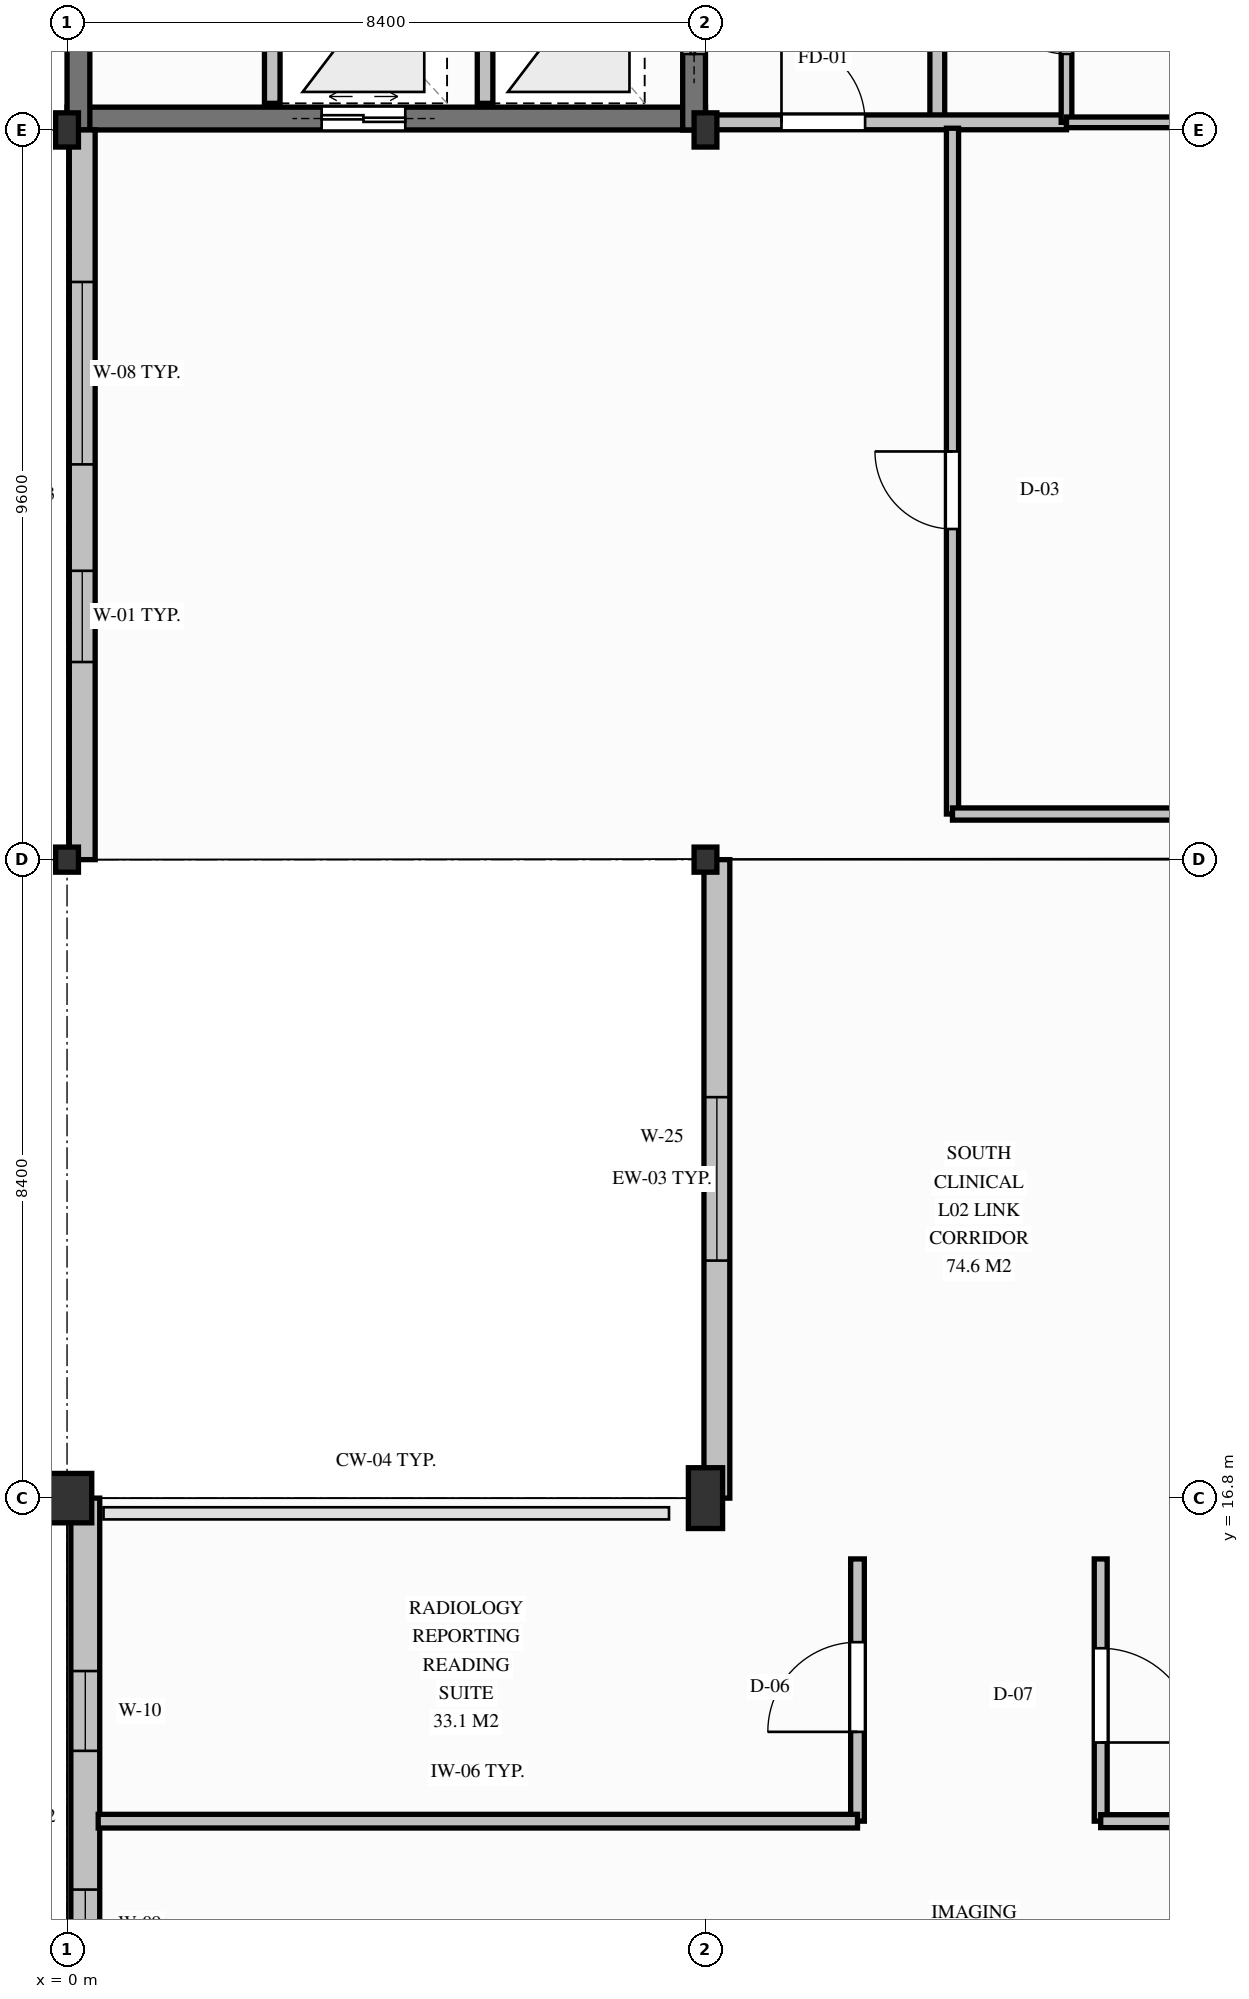
"""IFC4 building model, lengths in metres.
Left out: names, types, materials, properties, quantities, classifications, styles, units other than length and angle.
Written with IfcOpenShell. Run it as: python <this file> out.ifc"""

import sys

from ifc_helpers import new_model, si_unit, direction, frame, frame_2d, origin, origin_2d, place, context, subcontext, project, spatial, rectangle, circle, i_section, extrude, element, fill, save


model = new_model("IFC4")
c1 = context("Model", 3, precision=1e-05, world=origin(), true_north=direction((0.0, 1.0)))
c2 = subcontext(c1, "Body", "Model", "MODEL_VIEW")
j1 = project(units=[si_unit("LENGTHUNIT", "METRE"), si_unit("PLANEANGLEUNIT", "RADIAN")], contexts=[c1])
p1 = place(None, origin())
s1 = spatial("IfcSite", under=j1, at=p1, CompositionType="ELEMENT")
p2 = place(p1, origin())
s2 = spatial("IfcBuilding", under=s1, at=p2, CompositionType="ELEMENT")
p3 = place(p2, frame((0.0, 0.0, 9.0)))
s3 = spatial("IfcBuildingStorey", under=s2, at=p3, CompositionType="ELEMENT", Elevation=9.0)
p4 = place(p3, frame((0.0, 34.95, 0.0), z_axis=(0.0, 0.0, 1.0), x_axis=(1.0, 0.0, 0.0)))
e1 = element("IfcWall", 1, at=p4, inside=s3, PredefinedType="SHEAR", context=c2, shape_type="SweptSolid", body=[
    extrude(rectangle(XDim=8.4, YDim=0.3, at=frame_2d((4.2, 0.0))), origin(), (0.0, 0.0, 1.0), 4.2),
])
p5 = place(p4, frame((3.35, 0.0, 0.0)))
e2 = element("IfcOpeningElement", 2, at=p5, cuts=e1, PredefinedType="OPENING", context=c2, shape_type="SweptSolid", body=[
    extrude(rectangle(XDim=1.1, YDim=2.1, at=frame_2d((0.55, 1.05))), frame((0.0, 0.16, 0.0), z_axis=(0.0, -1.0, 0.0), x_axis=(1.0, 0.0, 0.0)), (0.0, 0.0, 1.0), 0.32),
])
p6 = place(p3, frame((0.15, 34.8, 0.0), z_axis=(0.0, 0.0, 1.0), x_axis=(0.0, 1.0, 0.0)))
e3 = element("IfcWall", 3, at=p6, inside=s3, PredefinedType="SHEAR", context=c2, shape_type="SweptSolid", body=[
    extrude(rectangle(XDim=8.0, YDim=0.3, at=frame_2d((4.0, 0.0))), origin(), (0.0, 0.0, 1.0), 4.2),
])
p7 = place(p3, frame((8.25, 34.8, 0.0), z_axis=(0.0, 0.0, 1.0), x_axis=(0.0, 1.0, 0.0)))
e4 = element("IfcWall", 4, at=p7, inside=s3, PredefinedType="SHEAR", context=c2, shape_type="SweptSolid", body=[
    extrude(rectangle(XDim=8.0, YDim=0.3, at=frame_2d((4.0, 0.0))), origin(), (0.0, 0.0, 1.0), 4.2),
])
p8 = place(p7, frame((2.95, 0.0, 0.0)))
e5 = element("IfcOpeningElement", 5, at=p8, cuts=e4, PredefinedType="OPENING", context=c2, shape_type="SweptSolid", body=[
    extrude(rectangle(XDim=1.1, YDim=2.15, at=frame_2d((0.55, 1.075))), frame((0.0, 0.16, 0.0), z_axis=(0.0, -1.0, 0.0), x_axis=(1.0, 0.0, 0.0)), (0.0, 0.0, 1.0), 0.32),
])
p9 = place(p7, frame((1.0, 0.0, 0.0)))
e6 = element("IfcOpeningElement", 6, at=p9, cuts=e4, PredefinedType="OPENING", context=c2, shape_type="SweptSolid", body=[
    extrude(rectangle(XDim=1.1, YDim=2.1, at=frame_2d((0.55, 1.05))), frame((0.0, 0.16, 0.0), z_axis=(0.0, -1.0, 0.0), x_axis=(1.0, 0.0, 0.0)), (0.0, 0.0, 1.0), 0.32),
])
p10 = place(p3, frame((0.0, 16.8, 0.0), z_axis=(0.0, 0.0, 1.0), x_axis=(1.0, 0.0, 0.0)))
e7 = element("IfcColumn", 7, at=p10, inside=s3, PredefinedType="COLUMN", context=c2, shape_type="SweptSolid", body=[
    extrude(circle(Radius=0.325, at=origin_2d()), origin(), (0.0, 0.0, 1.0), 4.2),
])
p11 = place(p3, frame((0.0, 25.2, 0.0), z_axis=(0.0, 0.0, 1.0), x_axis=(1.0, 0.0, 0.0)))
e8 = element("IfcColumn", 8, at=p11, inside=s3, PredefinedType="COLUMN", context=c2, shape_type="SweptSolid", body=[
    extrude(i_section(OverallWidth=0.3, OverallDepth=0.33, WebThickness=0.01, FlangeThickness=0.017, FilletRadius=0.027, at=origin_2d()), origin(), (0.0, 0.0, 1.0), 4.2),
])
p12 = place(p3, frame((0.0, 34.8, 0.0), z_axis=(0.0, 0.0, 1.0), x_axis=(1.0, 0.0, 0.0)))
e9 = element("IfcColumn", 9, at=p12, inside=s3, PredefinedType="COLUMN", context=c2, shape_type="SweptSolid", body=[
    extrude(i_section(OverallWidth=0.3, OverallDepth=0.45, WebThickness=0.014, FlangeThickness=0.026, FilletRadius=0.027, at=origin_2d()), origin(), (0.0, 0.0, 1.0), 4.2),
])
p13 = place(p3, frame((8.4, 16.8, 0.0), z_axis=(0.0, 0.0, 1.0), x_axis=(1.0, 0.0, 0.0)))
e10 = element("IfcColumn", 10, at=p13, inside=s3, PredefinedType="COLUMN", context=c2, shape_type="SweptSolid", body=[
    extrude(rectangle(XDim=0.45, YDim=0.8, at=origin_2d()), origin(), (0.0, 0.0, 1.0), 4.2),
])
p14 = place(p3, frame((8.4, 25.2, 0.0), z_axis=(0.0, 0.0, 1.0), x_axis=(1.0, 0.0, 0.0)))
e11 = element("IfcColumn", 11, at=p14, inside=s3, PredefinedType="COLUMN", context=c2, shape_type="SweptSolid", body=[
    extrude(i_section(OverallWidth=0.3, OverallDepth=0.33, WebThickness=0.01, FlangeThickness=0.017, FilletRadius=0.027, at=origin_2d()), origin(), (0.0, 0.0, 1.0), 4.2),
])
p15 = place(p3, frame((8.4, 34.8, 0.0), z_axis=(0.0, 0.0, 1.0), x_axis=(1.0, 0.0, 0.0)))
e12 = element("IfcColumn", 12, at=p15, inside=s3, PredefinedType="COLUMN", context=c2, shape_type="SweptSolid", body=[
    extrude(i_section(OverallWidth=0.3, OverallDepth=0.45, WebThickness=0.014, FlangeThickness=0.026, FilletRadius=0.027, at=origin_2d()), origin(), (0.0, 0.0, 1.0), 4.2),
])
p16 = place(p3, frame((0.24, 8.4, 0.0), z_axis=(0.0, 0.0, 1.0), x_axis=(0.0, 1.0, 0.0)))
e13 = element("IfcWall", 13, at=p16, inside=s3, PredefinedType="SOLIDWALL", context=c2, shape_type="SweptSolid", body=[
    extrude(rectangle(XDim=8.4, YDim=0.38, at=frame_2d((4.2, 0.0))), origin(), (0.0, 0.0, 1.0), 3.478),
])
p17 = place(p16, frame((2.35, 0.0, 0.85)))
e14 = element("IfcOpeningElement", 14, at=p17, cuts=e13, PredefinedType="OPENING", context=c2, shape_type="SweptSolid", body=[
    extrude(rectangle(XDim=0.9, YDim=1.8, at=frame_2d((0.45, 0.9))), frame((0.0, 0.2, 0.0), z_axis=(0.0, -1.0, 0.0), x_axis=(1.0, 0.0, 0.0)), (0.0, 0.0, 1.0), 0.4),
])
p18 = place(p16, frame((5.075, 0.0, 0.85)))
e15 = element("IfcOpeningElement", 15, at=p18, cuts=e13, PredefinedType="OPENING", context=c2, shape_type="SweptSolid", body=[
    extrude(rectangle(XDim=1.05, YDim=1.75, at=frame_2d((0.525, 0.875))), frame((0.0, 0.2, 0.0), z_axis=(0.0, -1.0, 0.0), x_axis=(1.0, 0.0, 0.0)), (0.0, 0.0, 1.0), 0.4),
])
p19 = place(p3, frame((8.55, 16.8, 0.0), z_axis=(0.0, 0.0, 1.0), x_axis=(0.0, 1.0, 0.0)))
e16 = element("IfcWall", 16, at=p19, inside=s3, PredefinedType="SOLIDWALL", context=c2, shape_type="SweptSolid", body=[
    extrude(rectangle(XDim=8.4, YDim=0.34, at=frame_2d((4.2, 0.0))), origin(), (0.0, 0.0, 1.0), 3.418),
])
p20 = place(p19, frame((3.125, 0.0, 0.85)))
e17 = element("IfcOpeningElement", 17, at=p20, cuts=e16, PredefinedType="OPENING", context=c2, shape_type="SweptSolid", body=[
    extrude(rectangle(XDim=2.15, YDim=1.75, at=frame_2d((1.075, 0.875))), frame((0.0, 0.18, 0.0), z_axis=(0.0, -1.0, 0.0), x_axis=(1.0, 0.0, 0.0)), (0.0, 0.0, 1.0), 0.36),
])
p21 = place(p3, frame((0.2, 25.2, 0.0), z_axis=(0.0, 0.0, 1.0), x_axis=(0.0, 1.0, 0.0)))
e18 = element("IfcWall", 18, at=p21, inside=s3, PredefinedType="SOLIDWALL", context=c2, shape_type="SweptSolid", body=[
    extrude(rectangle(XDim=9.6, YDim=0.34, at=frame_2d((4.8, 0.0))), origin(), (0.0, 0.0, 1.0), 3.418),
])
p22 = place(p21, frame((2.6, 0.0, 0.85)))
e19 = element("IfcOpeningElement", 19, at=p22, cuts=e18, PredefinedType="OPENING", context=c2, shape_type="SweptSolid", body=[
    extrude(rectangle(XDim=1.2, YDim=1.8, at=frame_2d((0.6, 0.9))), frame((0.0, 0.18, 0.0), z_axis=(0.0, -1.0, 0.0), x_axis=(1.0, 0.0, 0.0)), (0.0, 0.0, 1.0), 0.36),
])
p23 = place(p21, frame((5.2, 0.0, 0.85)))
e20 = element("IfcOpeningElement", 20, at=p23, cuts=e18, PredefinedType="OPENING", context=c2, shape_type="SweptSolid", body=[
    extrude(rectangle(XDim=2.4, YDim=2.05, at=frame_2d((1.2, 1.025))), frame((0.0, 0.18, 0.0), z_axis=(0.0, -1.0, 0.0), x_axis=(1.0, 0.0, 0.0)), (0.0, 0.0, 1.0), 0.36),
])
for number, where, z_axis, x_axis in (
    (21, (5.5, 35.15, 0.0), (0.0, 0.0, 1.0), (0.0, 1.0, 0.0)),
    (22, (2.7, 35.15, 0.0), (0.0, 0.0, 1.0), (0.0, 1.0, 0.0)),
):
    element("IfcWall", number, at=place(p3, frame(where, z_axis=z_axis, x_axis=x_axis)), inside=s3, PredefinedType="PARTITIONING", context=c2, shape_type="SweptSolid", body=[
        extrude(rectangle(XDim=2.4, YDim=0.205, at=frame_2d((1.2, 0.0))), origin(), (0.0, 0.0, 1.0), 3.93),
    ])
p24 = place(p3, frame((11.45, 34.9, 0.0), z_axis=(0.0, 0.0, 1.0), x_axis=(0.0, 1.0, 0.0)))
e23 = element("IfcWall", 23, at=p24, inside=s3, PredefinedType="PARTITIONING", context=c2, shape_type="SweptSolid", body=[
    extrude(rectangle(XDim=2.65, YDim=0.195, at=frame_2d((1.325, 0.0))), origin(), (0.0, 0.0, 1.0), 3.538),
])
p25 = place(p3, frame((8.35, 34.9, 0.0), z_axis=(0.0, 0.0, 1.0), x_axis=(1.0, 0.0, 0.0)))
e24 = element("IfcWall", 24, at=p25, inside=s3, PredefinedType="PARTITIONING", context=c2, shape_type="SweptSolid", body=[
    extrude(rectangle(XDim=4.8, YDim=0.195, at=frame_2d((2.4, 0.0))), origin(), (0.0, 0.0, 1.0), 3.488),
])
p26 = place(p25, frame((1.05, 0.0, 0.0)))
e25 = element("IfcOpeningElement", 25, at=p26, cuts=e24, PredefinedType="OPENING", context=c2, shape_type="SweptSolid", body=[
    extrude(rectangle(XDim=1.1, YDim=2.15, at=frame_2d((0.55, 1.075))), frame((0.0, 0.107, 0.0), z_axis=(0.0, -1.0, 0.0), x_axis=(1.0, 0.0, 0.0)), (0.0, 0.0, 1.0), 0.215),
])
p27 = place(p3, frame((13.15, 34.9, 0.0), z_axis=(0.0, 0.0, 1.0), x_axis=(0.0, 1.0, 0.0)))
e26 = element("IfcWall", 26, at=p27, inside=s3, PredefinedType="PARTITIONING", context=c2, shape_type="SweptSolid", body=[
    extrude(rectangle(XDim=7.82, YDim=0.14, at=frame_2d((3.91, 0.0))), origin(), (0.0, 0.0, 1.0), 3.538),
])
p28 = place(p27, frame((0.9, 0.0, 0.0)))
e27 = element("IfcOpeningElement", 27, at=p28, cuts=e26, PredefinedType="OPENING", context=c2, shape_type="SweptSolid", body=[
    extrude(rectangle(XDim=0.95, YDim=2.12, at=frame_2d((0.475, 1.06))), frame((0.0, 0.08, 0.0), z_axis=(0.0, -1.0, 0.0), x_axis=(1.0, 0.0, 0.0)), (0.0, 0.0, 1.0), 0.16),
])
p29 = place(p27, frame((3.55, 0.0, 0.0)))
e28 = element("IfcOpeningElement", 28, at=p29, cuts=e26, PredefinedType="OPENING", context=c2, shape_type="SweptSolid", body=[
    extrude(rectangle(XDim=0.98, YDim=2.14, at=frame_2d((0.49, 1.07))), frame((0.0, 0.08, 0.0), z_axis=(0.0, -1.0, 0.0), x_axis=(1.0, 0.0, 0.0)), (0.0, 0.0, 1.0), 0.16),
])
p30 = place(p27, frame((6.08, 0.0, 0.0)))
e29 = element("IfcOpeningElement", 29, at=p30, cuts=e26, PredefinedType="OPENING", context=c2, shape_type="SweptSolid", body=[
    extrude(rectangle(XDim=0.98, YDim=2.14, at=frame_2d((0.49, 1.07))), frame((0.0, 0.08, 0.0), z_axis=(0.0, -1.0, 0.0), x_axis=(1.0, 0.0, 0.0)), (0.0, 0.0, 1.0), 0.16),
])
p31 = place(p3, frame((13.15, 34.9, 0.0), z_axis=(0.0, 0.0, 1.0), x_axis=(1.0, 0.0, 0.0)))
e30 = element("IfcWall", 30, at=p31, inside=s3, PredefinedType="PARTITIONING", context=c2, shape_type="SweptSolid", body=[
    extrude(rectangle(XDim=3.45, YDim=0.14, at=frame_2d((1.725, 0.0))), origin(), (0.0, 0.0, 1.0), 3.538),
])
p32 = place(p3, frame((10.4, 12.55, 0.0), z_axis=(0.0, 0.0, 1.0), x_axis=(0.0, 1.0, 0.0)))
e31 = element("IfcWall", 31, at=p32, inside=s3, PredefinedType="PARTITIONING", context=c2, shape_type="SweptSolid", body=[
    extrude(rectangle(XDim=3.45, YDim=0.18, at=frame_2d((1.725, 0.0))), origin(), (0.0, 0.0, 1.0), 3.93),
])
p33 = place(p32, frame((1.175, 0.0, 0.0)))
e32 = element("IfcOpeningElement", 32, at=p33, cuts=e31, PredefinedType="OPENING", context=c2, shape_type="SweptSolid", body=[
    extrude(rectangle(XDim=1.18, YDim=2.2, at=frame_2d((0.59, 1.1))), frame((0.0, 0.1, 0.0), z_axis=(0.0, -1.0, 0.0), x_axis=(1.0, 0.0, 0.0)), (0.0, 0.0, 1.0), 0.2),
])
p34 = place(p3, frame((0.41, 12.55, 0.0), z_axis=(0.0, 0.0, 1.0), x_axis=(1.0, 0.0, 0.0)))
e33 = element("IfcWall", 33, at=p34, inside=s3, PredefinedType="PARTITIONING", context=c2, shape_type="SweptSolid", body=[
    extrude(rectangle(XDim=9.99, YDim=0.18, at=frame_2d((4.995, 0.0))), origin(), (0.0, 0.0, 1.0), 3.578),
])
p35 = place(p3, frame((13.6, 16.0, 0.0), z_axis=(0.0, 0.0, 1.0), x_axis=(0.0, -1.0, 0.0)))
e34 = element("IfcWall", 34, at=p35, inside=s3, PredefinedType="PARTITIONING", context=c2, shape_type="SweptSolid", body=[
    extrude(rectangle(XDim=3.45, YDim=0.17, at=frame_2d((1.725, 0.0))), origin(), (0.0, 0.0, 1.0), 3.93),
])
p36 = place(p35, frame((1.175, 0.0, 0.0)))
e35 = element("IfcOpeningElement", 35, at=p36, cuts=e34, PredefinedType="OPENING", context=c2, shape_type="SweptSolid", body=[
    extrude(rectangle(XDim=1.24, YDim=2.2, at=frame_2d((0.62, 1.1))), frame((0.0, 0.095, 0.0), z_axis=(0.0, -1.0, 0.0), x_axis=(1.0, 0.0, 0.0)), (0.0, 0.0, 1.0), 0.19),
])
p37 = place(p3, frame((13.6, 12.55, 0.0), z_axis=(0.0, 0.0, 1.0), x_axis=(1.0, 0.0, 0.0)))
e36 = element("IfcWall", 36, at=p37, inside=s3, PredefinedType="PARTITIONING", context=c2, shape_type="SweptSolid", body=[
    extrude(rectangle(XDim=19.65, YDim=0.17, at=frame_2d((9.825, 0.0))), origin(), (0.0, 0.0, 1.0), 3.368),
])
p38 = place(p3, frame((11.65, 25.8, 0.0), z_axis=(0.0, 0.0, 1.0), x_axis=(0.0, 1.0, 0.0)))
e37 = element("IfcWall", 37, at=p38, inside=s3, PredefinedType="PARTITIONING", context=c2, shape_type="SweptSolid", body=[
    extrude(rectangle(XDim=9.022, YDim=0.16, at=frame_2d((4.511, 0.0))), origin(), (0.0, 0.0, 1.0), 3.538),
])
p39 = place(p38, frame((3.75, 0.0, 0.0)))
e38 = element("IfcOpeningElement", 38, at=p39, cuts=e37, PredefinedType="OPENING", context=c2, shape_type="SweptSolid", body=[
    extrude(rectangle(XDim=1.02, YDim=2.15, at=frame_2d((0.51, 1.075))), frame((0.0, 0.09, 0.0), z_axis=(0.0, -1.0, 0.0), x_axis=(1.0, 0.0, 0.0)), (0.0, 0.0, 1.0), 0.18),
])
p40 = place(p3, frame((24.8, 25.8, 0.0), z_axis=(0.0, 0.0, 1.0), x_axis=(-1.0, 0.0, 0.0)))
e39 = element("IfcWall", 39, at=p40, inside=s3, PredefinedType="PARTITIONING", context=c2, shape_type="SweptSolid", body=[
    extrude(rectangle(XDim=13.15, YDim=0.16, at=frame_2d((6.575, 0.0))), origin(), (0.0, 0.0, 1.0), 3.578),
])
p41 = place(p17, origin())
e40 = element("IfcWindow", 40, at=p41, inside=s3, PartitioningType="SINGLE_PANEL", PredefinedType="WINDOW", context=c2, shape_type="SweptSolid", body=[
    extrude(rectangle(XDim=0.9, YDim=1.8, at=frame_2d((0.45, 0.9))), frame((0.0, 0.03, 0.0), z_axis=(0.0, -1.0, 0.0), x_axis=(1.0, 0.0, 0.0)), (0.0, 0.0, 1.0), 0.06),
])
fill(e14, e40)
p42 = place(p18, origin())
e41 = element("IfcWindow", 41, at=p42, inside=s3, PartitioningType="SINGLE_PANEL", PredefinedType="WINDOW", context=c2, shape_type="SweptSolid", body=[
    extrude(rectangle(XDim=1.05, YDim=1.75, at=frame_2d((0.525, 0.875))), frame((0.0, 0.03, 0.0), z_axis=(0.0, -1.0, 0.0), x_axis=(1.0, 0.0, 0.0)), (0.0, 0.0, 1.0), 0.06),
])
fill(e15, e41)
p43 = place(p20, origin())
e42 = element("IfcWindow", 42, at=p43, inside=s3, PartitioningType="SINGLE_PANEL", PredefinedType="WINDOW", context=c2, shape_type="SweptSolid", body=[
    extrude(rectangle(XDim=2.15, YDim=1.75, at=frame_2d((1.075, 0.875))), frame((0.0, 0.03, 0.0), z_axis=(0.0, -1.0, 0.0), x_axis=(1.0, 0.0, 0.0)), (0.0, 0.0, 1.0), 0.06),
])
fill(e17, e42)
p44 = place(p22, origin())
e43 = element("IfcWindow", 43, at=p44, inside=s3, PartitioningType="SINGLE_PANEL", PredefinedType="WINDOW", context=c2, shape_type="SweptSolid", body=[
    extrude(rectangle(XDim=1.2, YDim=1.8, at=frame_2d((0.6, 0.9))), frame((0.0, 0.03, 0.0), z_axis=(0.0, -1.0, 0.0), x_axis=(1.0, 0.0, 0.0)), (0.0, 0.0, 1.0), 0.06),
])
fill(e19, e43)
p45 = place(p23, origin())
e44 = element("IfcWindow", 44, at=p45, inside=s3, PartitioningType="SINGLE_PANEL", PredefinedType="WINDOW", context=c2, shape_type="SweptSolid", body=[
    extrude(rectangle(XDim=2.4, YDim=2.05, at=frame_2d((1.2, 1.025))), frame((0.0, 0.03, 0.0), z_axis=(0.0, -1.0, 0.0), x_axis=(1.0, 0.0, 0.0)), (0.0, 0.0, 1.0), 0.06),
])
fill(e20, e44)
p46 = place(p9, origin())
e45 = element("IfcDoor", 45, at=p46, inside=s3, OperationType="DOUBLE_DOOR_SLIDING", PredefinedType="DOOR", context=c2, shape_type="SweptSolid", body=[
    extrude(rectangle(XDim=1.1, YDim=2.1, at=frame_2d((0.55, 1.05))), frame((0.0, 0.025, 0.0), z_axis=(0.0, -1.0, 0.0), x_axis=(1.0, 0.0, 0.0)), (0.0, 0.0, 1.0), 0.05),
])
fill(e6, e45)
p47 = place(p5, origin())
e46 = element("IfcDoor", 46, at=p47, inside=s3, OperationType="DOUBLE_DOOR_SLIDING", PredefinedType="DOOR", context=c2, shape_type="SweptSolid", body=[
    extrude(rectangle(XDim=1.1, YDim=2.1, at=frame_2d((0.55, 1.05))), frame((0.0, 0.025, 0.0), z_axis=(0.0, -1.0, 0.0), x_axis=(1.0, 0.0, 0.0)), (0.0, 0.0, 1.0), 0.05),
])
fill(e2, e46)
p48 = place(p26, origin())
e47 = element("IfcDoor", 47, at=p48, inside=s3, OperationType="SINGLE_SWING_LEFT", PredefinedType="DOOR", context=c2, shape_type="SweptSolid", body=[
    extrude(rectangle(XDim=1.1, YDim=2.15, at=frame_2d((0.55, 1.075))), frame((0.0, 0.025, 0.0), z_axis=(0.0, -1.0, 0.0), x_axis=(1.0, 0.0, 0.0)), (0.0, 0.0, 1.0), 0.05),
])
fill(e25, e47)
p49 = place(p28, origin())
e48 = element("IfcDoor", 48, at=p49, inside=s3, OperationType="SINGLE_SWING_RIGHT", PredefinedType="DOOR", context=c2, shape_type="SweptSolid", body=[
    extrude(rectangle(XDim=0.95, YDim=2.12, at=frame_2d((0.475, 1.06))), frame((0.0, 0.025, 0.0), z_axis=(0.0, -1.0, 0.0), x_axis=(1.0, 0.0, 0.0)), (0.0, 0.0, 1.0), 0.05),
])
fill(e27, e48)
p50 = place(p33, origin())
e49 = element("IfcDoor", 49, at=p50, inside=s3, OperationType="SINGLE_SWING_LEFT", PredefinedType="DOOR", context=c2, shape_type="SweptSolid", body=[
    extrude(rectangle(XDim=1.18, YDim=2.2, at=frame_2d((0.59, 1.1))), frame((0.0, 0.025, 0.0), z_axis=(0.0, -1.0, 0.0), x_axis=(1.0, 0.0, 0.0)), (0.0, 0.0, 1.0), 0.05),
])
fill(e32, e49)
p51 = place(p36, origin())
e50 = element("IfcDoor", 50, at=p51, inside=s3, OperationType="SINGLE_SWING_RIGHT", PredefinedType="DOOR", context=c2, shape_type="SweptSolid", body=[
    extrude(rectangle(XDim=1.24, YDim=2.2, at=frame_2d((0.62, 1.1))), frame((0.0, 0.025, 0.0), z_axis=(0.0, -1.0, 0.0), x_axis=(1.0, 0.0, 0.0)), (0.0, 0.0, 1.0), 0.05),
])
fill(e35, e50)
p52 = place(p39, origin())
e51 = element("IfcDoor", 51, at=p52, inside=s3, OperationType="SINGLE_SWING_RIGHT", PredefinedType="DOOR", context=c2, shape_type="SweptSolid", body=[
    extrude(rectangle(XDim=1.02, YDim=2.15, at=frame_2d((0.51, 1.075))), frame((0.0, 0.025, 0.0), z_axis=(0.0, -1.0, 0.0), x_axis=(1.0, 0.0, 0.0)), (0.0, 0.0, 1.0), 0.05),
])
fill(e38, e51)
save(model, sys.argv[1])
